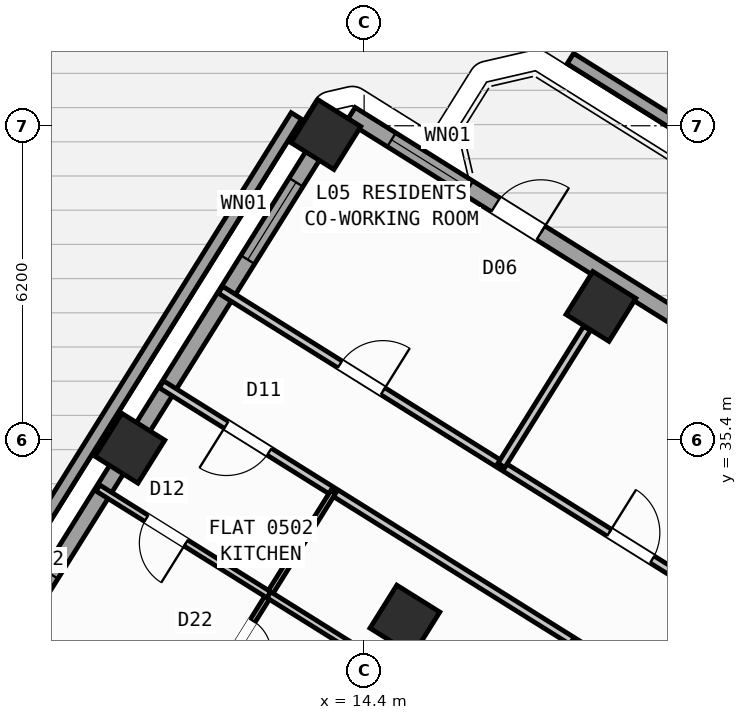
"""IFC4 building model, lengths in metres.
Left out: names, types, materials, properties, quantities, classifications, styles, units other than length and angle.
Written with IfcOpenShell. Run it as: python <this file> out.ifc"""

import sys

from ifc_helpers import new_model, si_unit, direction, frame, frame_2d, origin, origin_2d, place, context, subcontext, project, spatial, rectangle, hollow_rectangle, extrude, source, transform, mapped, element, fill, save


model = new_model("IFC4")
c1 = context("Model", 3, precision=1e-05, world=origin(), true_north=direction((0.0, 1.0)))
c2 = subcontext(c1, "Body", "Model", "MODEL_VIEW")
j1 = project(units=[si_unit("LENGTHUNIT", "METRE"), si_unit("PLANEANGLEUNIT", "RADIAN")], contexts=[c1])
p1 = place(None, origin())
s1 = spatial("IfcSite", under=j1, at=p1, CompositionType="ELEMENT")
p2 = place(p1, origin())
s2 = spatial("IfcBuilding", under=s1, at=p2, CompositionType="ELEMENT")
p3 = place(p2, frame((0.0, 0.0, 24.0)))
s3 = spatial("IfcBuildingStorey", under=s2, at=p3, CompositionType="ELEMENT", Elevation=24.0)
m1 = source(origin(), c2, "Body", "SweptSolid", [
    extrude(hollow_rectangle(XDim=1.0, YDim=1.0, WallThickness=0.04, at=origin_2d()), origin(), (0.0, 0.0, 1.0), 3.6),
])
for number, where, z_axis, x_axis in (
    (1, (19.073, 38.034, 0.0), (0.0, 0.0, 1.0), (-0.848, 0.53, 0.0)),
    (2, (15.205, 31.844, 0.0), (0.0, 0.0, 1.0), (-0.848, 0.53, 0.0)),
    (3, (13.646, 41.426, 0.0), (0.0, 0.0, 1.0), (-0.848, 0.53, 0.0)),
    (4, (9.777, 35.235, 0.0), (0.0, 0.0, 1.0), (-0.848, 0.53, 0.0)),
):
    element("IfcColumn", number, at=place(p3, frame(where, z_axis=z_axis, x_axis=x_axis)), inside=s3, PredefinedType="COLUMN", context=c2, shape_type="MappedRepresentation", body=[
        mapped(m1, transform((0.0, 0.0, 0.0), scale=1.0)),
    ])
p4 = place(p3, frame((30.672, 35.303, 0.0), z_axis=(0.0, 0.0, 1.0), x_axis=(-0.848051685884, 0.529913519425, 0.0)))
e5 = element("IfcWall", 5, at=p4, inside=s3, PredefinedType="PARAPET", context=c2, shape_type="SweptSolid", body=[
    extrude(rectangle(XDim=14.387, YDim=0.24, at=frame_2d((7.194, 0.0))), origin(), (0.0, 0.0, 1.0), 1.15),
])
p5 = place(p3, frame((13.062, 41.795, 0.0), z_axis=(0.0, 0.0, 1.0), x_axis=(-0.529921946396, -0.848046420149, 0.0)))
e6 = element("IfcWall", 6, at=p5, inside=s3, PredefinedType="PARAPET", context=c2, shape_type="SweptSolid", body=[
    extrude(rectangle(XDim=20.808, YDim=0.24, at=frame_2d((10.404, 0.0))), origin(), (0.0, 0.0, 1.0), 1.15),
])
p6 = place(p3, frame((2.415, 23.452, 0.0), z_axis=(0.0, 0.0, 1.0), x_axis=(0.52991049553, 0.848053575387, 0.0)))
e7 = element("IfcWall", 7, at=p6, inside=s3, PredefinedType="STANDARD", context=c2, shape_type="SweptSolid", body=[
    extrude(rectangle(XDim=21.587, YDim=0.32, at=frame_2d((10.794, 0.0))), origin(), (0.0, 0.0, 1.0), 2.725),
])
p7 = place(p6, frame((8.859, 0.0, 0.8)))
e8 = element("IfcOpeningElement", 8, at=p7, cuts=e7, PredefinedType="OPENING", context=c2, shape_type="SweptSolid", body=[
    extrude(rectangle(XDim=2.1, YDim=1.55, at=frame_2d((1.05, 0.775))), frame((0.0, 0.17, 0.0), z_axis=(0.0, -1.0, 0.0), x_axis=(1.0, 0.0, 0.0)), (0.0, 0.0, 1.0), 0.34),
])
p8 = place(p6, frame((18.284, 0.0, 0.85)))
e9 = element("IfcOpeningElement", 9, at=p8, cuts=e7, PredefinedType="OPENING", context=c2, shape_type="SweptSolid", body=[
    extrude(rectangle(XDim=1.8, YDim=1.5, at=frame_2d((0.9, 0.75))), frame((0.0, 0.17, 0.0), z_axis=(0.0, -1.0, 0.0), x_axis=(1.0, 0.0, 0.0)), (0.0, 0.0, 1.0), 0.34),
])
p9 = place(p3, frame((14.138, 41.825, 0.0), z_axis=(0.0, 0.0, 1.0), x_axis=(0.848046498049, -0.529921821731, 0.0)))
e10 = element("IfcWall", 10, at=p9, inside=s3, PredefinedType="STANDARD", context=c2, shape_type="SweptSolid", body=[
    extrude(rectangle(XDim=31.588, YDim=0.32, at=frame_2d((15.794, 0.0))), origin(), (0.0, 0.0, 1.0), 3.35),
])
p10 = place(p9, frame((3.369, 0.0, 0.0)))
e11 = element("IfcOpeningElement", 11, at=p10, cuts=e10, PredefinedType="OPENING", context=c2, shape_type="SweptSolid", body=[
    extrude(rectangle(XDim=1.05, YDim=2.15, at=frame_2d((0.525, 1.075))), frame((0.0, 0.17, 0.0), z_axis=(0.0, -1.0, 0.0), x_axis=(1.0, 0.0, 0.0)), (0.0, 0.0, 1.0), 0.34),
])
p11 = place(p9, frame((0.946, 0.0, 0.85)))
e12 = element("IfcOpeningElement", 12, at=p11, cuts=e10, PredefinedType="OPENING", context=c2, shape_type="SweptSolid", body=[
    extrude(rectangle(XDim=1.8, YDim=1.5, at=frame_2d((0.9, 0.75))), frame((0.0, 0.17, 0.0), z_axis=(0.0, -1.0, 0.0), x_axis=(1.0, 0.0, 0.0)), (0.0, 0.0, 1.0), 0.34),
])
p12 = place(p9, frame((8.46, 0.0, 0.85)))
e13 = element("IfcOpeningElement", 13, at=p12, cuts=e10, PredefinedType="OPENING", context=c2, shape_type="SweptSolid", body=[
    extrude(rectangle(XDim=1.8, YDim=1.5, at=frame_2d((0.9, 0.75))), frame((0.0, 0.17, 0.0), z_axis=(0.0, -1.0, 0.0), x_axis=(1.0, 0.0, 0.0)), (0.0, 0.0, 1.0), 0.34),
])
p13 = place(p9, frame((13.899, 0.0, 0.85)))
e14 = element("IfcOpeningElement", 14, at=p13, cuts=e10, PredefinedType="OPENING", context=c2, shape_type="SweptSolid", body=[
    extrude(rectangle(XDim=1.5, YDim=1.5, at=frame_2d((0.75, 0.75))), frame((0.0, 0.17, 0.0), z_axis=(0.0, -1.0, 0.0), x_axis=(1.0, 0.0, 0.0)), (0.0, 0.0, 1.0), 0.34),
])
p14 = place(p9, frame((22.019, 0.0, 0.95)))
e15 = element("IfcOpeningElement", 15, at=p14, cuts=e10, PredefinedType="OPENING", context=c2, shape_type="SweptSolid", body=[
    extrude(rectangle(XDim=1.2, YDim=1.4, at=frame_2d((0.6, 0.7))), frame((0.0, 0.17, 0.0), z_axis=(0.0, -1.0, 0.0), x_axis=(1.0, 0.0, 0.0)), (0.0, 0.0, 1.0), 0.34),
])
p15 = place(p9, frame((27.569, 0.0, 0.95)))
e16 = element("IfcOpeningElement", 16, at=p15, cuts=e10, PredefinedType="OPENING", context=c2, shape_type="SweptSolid", body=[
    extrude(rectangle(XDim=1.2, YDim=1.4, at=frame_2d((0.6, 0.7))), frame((0.0, 0.17, 0.0), z_axis=(0.0, -1.0, 0.0), x_axis=(1.0, 0.0, 0.0)), (0.0, 0.0, 1.0), 0.34),
])
p16 = place(p3, frame((25.754, 29.497, 0.0), z_axis=(0.0, 0.0, 1.0), x_axis=(-0.848045850158, 0.529922858565, 0.0)))
e17 = element("IfcWall", 17, at=p16, inside=s3, PredefinedType="PARTITIONING", context=c2, shape_type="SweptSolid", body=[
    extrude(rectangle(XDim=16.73, YDim=0.16, at=frame_2d((8.365, 0.0))), origin(), (0.0, 0.0, 1.0), 3.34),
])
p17 = place(p16, frame((1.588, 0.0, 0.0)))
e18 = element("IfcOpeningElement", 18, at=p17, cuts=e17, PredefinedType="OPENING", context=c2, shape_type="SweptSolid", body=[
    extrude(rectangle(XDim=1.0, YDim=2.1, at=frame_2d((0.5, 1.05))), frame((0.0, 0.09, 0.0), z_axis=(0.0, -1.0, 0.0), x_axis=(1.0, 0.0, 0.0)), (0.0, 0.0, 1.0), 0.18),
])
p18 = place(p16, frame((6.685, 0.0, 0.0)))
e19 = element("IfcOpeningElement", 19, at=p18, cuts=e17, PredefinedType="OPENING", context=c2, shape_type="SweptSolid", body=[
    extrude(rectangle(XDim=1.0, YDim=2.1, at=frame_2d((0.5, 1.05))), frame((0.0, 0.09, 0.0), z_axis=(0.0, -1.0, 0.0), x_axis=(1.0, 0.0, 0.0)), (0.0, 0.0, 1.0), 0.18),
])
p19 = place(p16, frame((12.951, 0.0, 0.0)))
e20 = element("IfcOpeningElement", 20, at=p19, cuts=e17, PredefinedType="OPENING", context=c2, shape_type="SweptSolid", body=[
    extrude(rectangle(XDim=1.0, YDim=2.1, at=frame_2d((0.5, 1.05))), frame((0.0, 0.09, 0.0), z_axis=(0.0, -1.0, 0.0), x_axis=(1.0, 0.0, 0.0)), (0.0, 0.0, 1.0), 0.18),
])
p20 = place(p3, frame((24.588, 27.631, 0.0), z_axis=(0.0, 0.0, 1.0), x_axis=(-0.848041752158, 0.529929416617, 0.0)))
e21 = element("IfcWall", 21, at=p20, inside=s3, PredefinedType="PARTITIONING", context=c2, shape_type="SweptSolid", body=[
    extrude(rectangle(XDim=16.73, YDim=0.16, at=frame_2d((8.365, 0.0))), origin(), (0.0, 0.0, 1.0), 3.34),
])
p21 = place(p20, frame((2.22, 0.0, 0.0)))
e22 = element("IfcOpeningElement", 22, at=p21, cuts=e21, PredefinedType="OPENING", context=c2, shape_type="SweptSolid", body=[
    extrude(rectangle(XDim=0.86, YDim=2.05, at=frame_2d((0.43, 1.025))), frame((0.0, 0.09, 0.0), z_axis=(0.0, -1.0, 0.0), x_axis=(1.0, 0.0, 0.0)), (0.0, 0.0, 1.0), 0.18),
])
p22 = place(p20, frame((14.22, 0.0, 0.0)))
e23 = element("IfcOpeningElement", 23, at=p22, cuts=e21, PredefinedType="OPENING", context=c2, shape_type="SweptSolid", body=[
    extrude(rectangle(XDim=1.0, YDim=2.1, at=frame_2d((0.5, 1.05))), frame((0.0, 0.09, 0.0), z_axis=(0.0, -1.0, 0.0), x_axis=(1.0, 0.0, 0.0)), (0.0, 0.0, 1.0), 0.18),
])
p23 = place(p3, frame((13.792, 34.377, 0.0), z_axis=(0.0, 0.0, 1.0), x_axis=(-0.529924475241, -0.848044839935, 0.0)))
e24 = element("IfcWall", 24, at=p23, inside=s3, PredefinedType="PARTITIONING", context=c2, shape_type="SweptSolid", body=[
    extrude(rectangle(XDim=15.62, YDim=0.11, at=frame_2d((7.81, 0.0))), origin(), (0.0, 0.0, 1.0), 3.34),
])
p24 = place(p23, frame((3.0, 0.0, 0.0)))
e25 = element("IfcOpeningElement", 25, at=p24, cuts=e24, PredefinedType="OPENING", context=c2, shape_type="SweptSolid", body=[
    extrude(rectangle(XDim=0.78, YDim=2.05, at=frame_2d((0.39, 1.025))), frame((0.0, 0.065, 0.0), z_axis=(0.0, -1.0, 0.0), x_axis=(1.0, 0.0, 0.0)), (0.0, 0.0, 1.0), 0.13),
])
p25 = place(p3, frame((12.521, 32.342, 0.0), z_axis=(0.0, 0.0, 1.0), x_axis=(-0.848043100782, 0.52992725842, 0.0)))
e26 = element("IfcWall", 26, at=p25, inside=s3, PredefinedType="PLUMBINGWALL", context=c2, shape_type="SweptSolid", body=[
    extrude(rectangle(XDim=3.98, YDim=0.14, at=frame_2d((1.99, 0.0))), origin(), (0.0, 0.0, 1.0), 3.34),
])
p26 = place(p25, frame((1.93, 0.0, 0.0)))
e27 = element("IfcOpeningElement", 27, at=p26, cuts=e26, PredefinedType="OPENING", context=c2, shape_type="SweptSolid", body=[
    extrude(rectangle(XDim=0.92, YDim=2.08, at=frame_2d((0.46, 1.04))), frame((0.0, 0.08, 0.0), z_axis=(0.0, -1.0, 0.0), x_axis=(1.0, 0.0, 0.0)), (0.0, 0.0, 1.0), 0.16),
])
p27 = place(p3, frame((20.102, 27.604, 0.0), z_axis=(0.0, 0.0, 1.0), x_axis=(-0.848044326704, 0.52992529657, 0.0)))
e28 = element("IfcWall", 28, at=p27, inside=s3, PredefinedType="PLUMBINGWALL", context=c2, shape_type="SweptSolid", body=[
    extrude(rectangle(XDim=8.94, YDim=0.14, at=frame_2d((4.47, 0.0))), origin(), (0.0, 0.0, 1.0), 3.34),
])
p28 = place(p27, frame((5.087, 0.0, 0.0)))
e29 = element("IfcOpeningElement", 29, at=p28, cuts=e28, PredefinedType="OPENING", context=c2, shape_type="SweptSolid", body=[
    extrude(rectangle(XDim=0.78, YDim=2.05, at=frame_2d((0.39, 1.025))), frame((0.0, 0.08, 0.0), z_axis=(0.0, -1.0, 0.0), x_axis=(1.0, 0.0, 0.0)), (0.0, 0.0, 1.0), 0.16),
])
p29 = place(p27, frame((1.218, 0.0, 0.0)))
e30 = element("IfcOpeningElement", 30, at=p29, cuts=e28, PredefinedType="OPENING", context=c2, shape_type="SweptSolid", body=[
    extrude(rectangle(XDim=0.78, YDim=2.05, at=frame_2d((0.39, 1.025))), frame((0.0, 0.08, 0.0), z_axis=(0.0, -1.0, 0.0), x_axis=(1.0, 0.0, 0.0)), (0.0, 0.0, 1.0), 0.16),
])
p30 = place(p3, frame((18.799, 37.602, 0.0), z_axis=(0.0, 0.0, 1.0), x_axis=(-0.529930102756, -0.848041323399, 0.0)))
e31 = element("IfcWall", 31, at=p30, inside=s3, PredefinedType="PARTITIONING", context=c2, shape_type="SweptSolid", body=[
    extrude(rectangle(XDim=3.188, YDim=0.16, at=frame_2d((1.594, 0.0))), origin(), (0.0, 0.0, 1.0), 2.725),
])
m2 = source(origin(), c2, "Body", "SweptSolid", [
    extrude(rectangle(XDim=1.05, YDim=2.15, at=frame_2d((0.525, 1.075))), frame((0.0, 0.025, 0.0), z_axis=(0.0, -1.0, 0.0), x_axis=(1.0, 0.0, 0.0)), (0.0, 0.0, 1.0), 0.05),
])
p31 = place(p10, origin())
e32 = element("IfcDoor", 32, at=p31, inside=s3, OperationType="SINGLE_SWING_RIGHT", PredefinedType="DOOR", context=c2, shape_type="MappedRepresentation", body=[
    mapped(m2, transform((0.0, 0.0, 0.0), scale=1.0)),
])
fill(e11, e32)
m3 = source(origin(), c2, "Body", "SweptSolid", [
    extrude(rectangle(XDim=1.8, YDim=1.5, at=frame_2d((0.9, 0.75))), frame((0.0, 0.03, 0.0), z_axis=(0.0, -1.0, 0.0), x_axis=(1.0, 0.0, 0.0)), (0.0, 0.0, 1.0), 0.06),
])
p32 = place(p8, origin())
e33 = element("IfcWindow", 33, at=p32, inside=s3, PartitioningType="SINGLE_PANEL", PredefinedType="WINDOW", context=c2, shape_type="MappedRepresentation", body=[
    mapped(m3, transform((0.0, 0.0, 0.0), scale=1.0)),
])
fill(e9, e33)
p33 = place(p11, origin())
e34 = element("IfcWindow", 34, at=p33, inside=s3, PartitioningType="SINGLE_PANEL", PredefinedType="WINDOW", context=c2, shape_type="MappedRepresentation", body=[
    mapped(m3, transform((0.0, 0.0, 0.0), scale=1.0)),
])
fill(e12, e34)
m4 = source(origin(), c2, "Body", "SweptSolid", [
    extrude(rectangle(XDim=1.0, YDim=2.1, at=frame_2d((0.5, 1.05))), frame((0.0, 0.025, 0.0), z_axis=(0.0, -1.0, 0.0), x_axis=(1.0, 0.0, 0.0)), (0.0, 0.0, 1.0), 0.05),
])
p34 = place(p22, origin())
e35 = element("IfcDoor", 35, at=p34, inside=s3, OperationType="SINGLE_SWING_RIGHT", PredefinedType="DOOR", context=c2, shape_type="MappedRepresentation", body=[
    mapped(m4, transform((0.0, 0.0, 0.0), scale=1.0)),
])
fill(e23, e35)
m5 = source(origin(), c2, "Body", "SweptSolid", [
    extrude(rectangle(XDim=0.92, YDim=2.08, at=frame_2d((0.46, 1.04))), frame((0.0, 0.025, 0.0), z_axis=(0.0, -1.0, 0.0), x_axis=(1.0, 0.0, 0.0)), (0.0, 0.0, 1.0), 0.05),
])
p35 = place(p26, origin())
e36 = element("IfcDoor", 36, at=p35, inside=s3, OperationType="SINGLE_SWING_LEFT", PredefinedType="DOOR", context=c2, shape_type="MappedRepresentation", body=[
    mapped(m5, transform((0.0, 0.0, 0.0), scale=1.0)),
])
fill(e27, e36)
m6 = source(origin(), c2, "Body", "SweptSolid", [
    extrude(rectangle(XDim=0.78, YDim=2.05, at=frame_2d((0.39, 1.025))), frame((0.0, 0.025, 0.0), z_axis=(0.0, -1.0, 0.0), x_axis=(1.0, 0.0, 0.0)), (0.0, 0.0, 1.0), 0.05),
])
p36 = place(p24, origin())
e37 = element("IfcDoor", 37, at=p36, inside=s3, OperationType="SINGLE_SWING_RIGHT", PredefinedType="DOOR", context=c2, shape_type="MappedRepresentation", body=[
    mapped(m6, transform((0.0, 0.0, 0.0), scale=1.0)),
])
fill(e25, e37)
p37 = place(p18, frame((1.0, 0.0, 0.0), z_axis=(0.0, 0.0, 1.0), x_axis=(-1.0, 0.0, 0.0)))
e38 = element("IfcDoor", 38, at=p37, inside=s3, OperationType="SINGLE_SWING_LEFT", PredefinedType="DOOR", context=c2, shape_type="MappedRepresentation", body=[
    mapped(m4, transform((0.0, 0.0, 0.0), scale=1.0)),
])
fill(e19, e38)
p38 = place(p19, frame((1.0, 0.0, 0.0), z_axis=(0.0, 0.0, 1.0), x_axis=(-1.0, 0.0, 0.0)))
e39 = element("IfcDoor", 39, at=p38, inside=s3, OperationType="SINGLE_SWING_RIGHT", PredefinedType="DOOR", context=c2, shape_type="MappedRepresentation", body=[
    mapped(m4, transform((0.0, 0.0, 0.0), scale=1.0)),
])
fill(e20, e39)
save(model, sys.argv[1])
